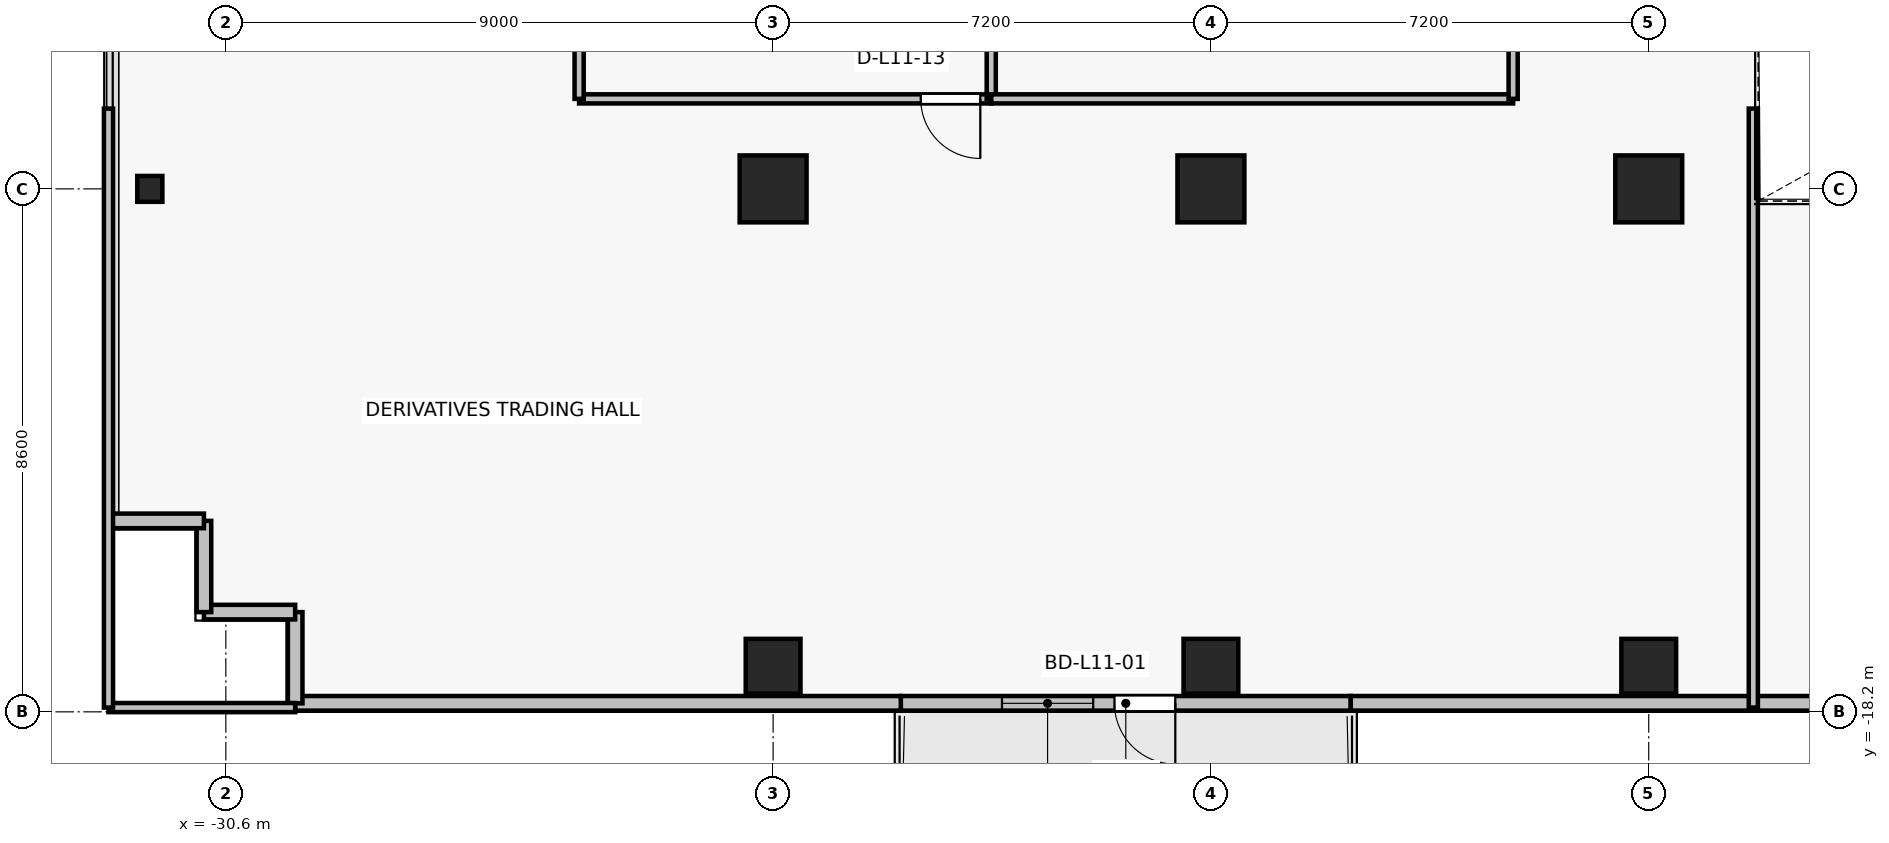
"""IFC4 building model, lengths in metres.
Left out: names, types, materials, properties, quantities, classifications, styles, units other than length and angle.
Written with IfcOpenShell. Run it as: python <this file> out.ifc"""

import sys

from ifc_helpers import new_model, si_unit, direction, frame, frame_2d, origin, origin_2d, place, context, subcontext, project, spatial, rectangle, i_section, extrude, source, transform, mapped, element, fill, save


model = new_model("IFC4")
c1 = context("Model", 3, precision=1e-05, world=origin(), true_north=direction((0.0, 1.0)))
c2 = subcontext(c1, "Body", "Model", "MODEL_VIEW")
j1 = project(units=[si_unit("LENGTHUNIT", "METRE"), si_unit("PLANEANGLEUNIT", "RADIAN")], contexts=[c1])
p1 = place(None, origin())
s1 = spatial("IfcSite", under=j1, at=p1, CompositionType="ELEMENT")
p2 = place(p1, origin())
s2 = spatial("IfcBuilding", under=s1, at=p2, CompositionType="ELEMENT")
p3 = place(p2, frame((0.0, 0.0, 43.9)))
s3 = spatial("IfcBuildingStorey", under=s2, at=p3, CompositionType="ELEMENT", Elevation=43.9)
for number, where, z_axis, x_axis in (
    (1, (-14.4, -9.6, 0.0), (0.0, 0.0, 1.0), (1.0, 0.0, 0.0)),
    (2, (-7.2, -9.6, 0.0), (0.0, 0.0, 1.0), (1.0, 0.0, 0.0)),
    (3, (-21.6, -9.6, 0.0), (0.0, 0.0, 1.0), (1.0, 0.0, 0.0)),
):
    element("IfcColumn", number, at=place(p3, frame(where, z_axis=z_axis, x_axis=x_axis)), inside=s3, PredefinedType="COLUMN", context=c2, shape_type="SweptSolid", body=[
        extrude(rectangle(XDim=1.1, YDim=1.1, at=origin_2d()), origin(), (0.0, 0.0, 1.0), 3.3),
    ])
for number, where, z_axis, x_axis in (
    (4, (-14.4, -17.45, 0.0), (0.0, 0.0, 1.0), (1.0, 0.0, 0.0)),
    (5, (-7.2, -17.45, 0.0), (0.0, 0.0, 1.0), (1.0, 0.0, 0.0)),
    (6, (-21.6, -17.45, 0.0), (0.0, 0.0, 1.0), (1.0, 0.0, 0.0)),
):
    element("IfcColumn", number, at=place(p3, frame(where, z_axis=z_axis, x_axis=x_axis)), inside=s3, PredefinedType="COLUMN", context=c2, shape_type="SweptSolid", body=[
        extrude(rectangle(XDim=0.9, YDim=0.9, at=origin_2d()), origin(), (0.0, 0.0, 1.0), 3.3),
    ])
p4 = place(p3, frame((-31.85, -9.6, 0.0), z_axis=(0.0, 0.0, 1.0), x_axis=(1.0, 0.0, 0.0)))
e7 = element("IfcColumn", 7, at=p4, inside=s3, PredefinedType="COLUMN", context=c2, shape_type="SweptSolid", body=[
    extrude(i_section(OverallWidth=0.412, OverallDepth=0.425, WebThickness=0.026, FlangeThickness=0.039, FilletRadius=0.015, at=origin_2d()), origin(), (0.0, 0.0, 1.0), 3.3),
])
p5 = place(p3, frame((-12.1, -18.06, 0.0), z_axis=(0.0, 0.0, 1.0), x_axis=(-1.0, 0.0, 0.0)))
e8 = element("IfcWall", 8, at=p5, inside=s3, PredefinedType="SOLIDWALL", context=c2, shape_type="SweptSolid", body=[
    extrude(rectangle(XDim=7.4, YDim=0.24, at=frame_2d((3.7, 0.0))), origin(), (0.0, 0.0, 1.0), 2.665),
])
p6 = place(p5, frame((2.886, 0.0, 0.0)))
e9 = element("IfcOpeningElement", 9, at=p6, cuts=e8, PredefinedType="OPENING", context=c2, shape_type="SweptSolid", body=[
    extrude(rectangle(XDim=1.0, YDim=2.2, at=frame_2d((0.5, 1.1))), frame((0.0, 0.13, 0.0), z_axis=(0.0, -1.0, 0.0), x_axis=(1.0, 0.0, 0.0)), (0.0, 0.0, 1.0), 0.26),
])
p7 = place(p5, frame((4.236, 0.0, 0.85)))
e10 = element("IfcOpeningElement", 10, at=p7, cuts=e8, PredefinedType="OPENING", context=c2, shape_type="SweptSolid", body=[
    extrude(rectangle(XDim=1.5, YDim=1.6, at=frame_2d((0.75, 0.8))), frame((0.0, 0.13, 0.0), z_axis=(0.0, -1.0, 0.0), x_axis=(1.0, 0.0, 0.0)), (0.0, 0.0, 1.0), 0.26),
])
p8 = place(p3, frame((-12.1, -18.06, 0.0), z_axis=(0.0, 0.0, 1.0), x_axis=(1.0, 0.0, 0.0)))
e11 = element("IfcWall", 11, at=p8, inside=s3, PredefinedType="SOLIDWALL", context=c2, shape_type="SweptSolid", body=[
    extrude(rectangle(XDim=8.76, YDim=0.24, at=frame_2d((4.38, 0.0))), origin(), (0.0, 0.0, 1.0), 3.075),
])
p9 = place(p3, frame((-29.46, -18.06, 0.0), z_axis=(0.0, 0.0, 1.0), x_axis=(1.0, 0.0, 0.0)))
e12 = element("IfcWall", 12, at=p9, inside=s3, PredefinedType="SOLIDWALL", context=c2, shape_type="SweptSolid", body=[
    extrude(rectangle(XDim=9.96, YDim=0.24, at=frame_2d((4.98, 0.0))), origin(), (0.0, 0.0, 1.0), 2.665),
])
for number, where, z_axis, x_axis in (
    (13, (-29.46, -16.56, 0.0), (0.0, 0.0, 1.0), (0.0, -1.0, 0.0)),
    (14, (-30.96, -16.56, 0.0), (0.0, 0.0, 1.0), (1.0, 0.0, 0.0)),
    (15, (-30.96, -15.06, 0.0), (0.0, 0.0, 1.0), (0.0, -1.0, 0.0)),
    (16, (-32.46, -15.06, 0.0), (0.0, 0.0, 1.0), (1.0, 0.0, 0.0)),
):
    element("IfcWall", number, at=place(p3, frame(where, z_axis=z_axis, x_axis=x_axis)), inside=s3, PredefinedType="SOLIDWALL", context=c2, shape_type="SweptSolid", body=[
        extrude(rectangle(XDim=1.5, YDim=0.24, at=frame_2d((0.75, 0.0))), origin(), (0.0, 0.0, 1.0), 3.075),
    ])
p10 = place(p3, frame((-18.012, -8.12, 0.0), z_axis=(0.0, 0.0, 1.0), x_axis=(-1.0, 0.0, 0.0)))
e17 = element("IfcWall", 17, at=p10, inside=s3, PredefinedType="PARTITIONING", context=c2, shape_type="SweptSolid", body=[
    extrude(rectangle(XDim=6.778, YDim=0.15, at=frame_2d((3.389, 0.0))), origin(), (0.0, 0.0, 1.0), 2.465),
])
p11 = place(p10, frame((0.18, 0.0, 0.0)))
e18 = element("IfcOpeningElement", 18, at=p11, cuts=e17, PredefinedType="OPENING", context=c2, shape_type="SweptSolid", body=[
    extrude(rectangle(XDim=0.98, YDim=2.15, at=frame_2d((0.49, 1.075))), frame((0.0, 0.085, 0.0), z_axis=(0.0, -1.0, 0.0), x_axis=(1.0, 0.0, 0.0)), (0.0, 0.0, 1.0), 0.17),
])
for number, where, z_axis, x_axis in (
    (19, (-24.79, -8.12, 0.0), (0.0, 0.0, 1.0), (0.0, 1.0, 0.0)),
    (20, (-18.012, -3.83, 0.0), (0.0, 0.0, 1.0), (0.0, -1.0, 0.0)),
):
    element("IfcWall", number, at=place(p3, frame(where, z_axis=z_axis, x_axis=x_axis)), inside=s3, PredefinedType="PARTITIONING", context=c2, shape_type="SweptSolid", body=[
        extrude(rectangle(XDim=4.29, YDim=0.15, at=frame_2d((2.145, 0.0))), origin(), (0.0, 0.0, 1.0), 2.565),
    ])
p12 = place(p3, frame((-9.43, -8.12, 0.0), z_axis=(0.0, 0.0, 1.0), x_axis=(-1.0, 0.0, 0.0)))
e21 = element("IfcWall", 21, at=p12, inside=s3, PredefinedType="PARTITIONING", context=c2, shape_type="SweptSolid", body=[
    extrude(rectangle(XDim=8.583, YDim=0.15, at=frame_2d((4.291, 0.0))), origin(), (0.0, 0.0, 1.0), 2.465),
])
p13 = place(p3, frame((-9.43, -3.83, 0.0), z_axis=(0.0, 0.0, 1.0), x_axis=(0.0, -1.0, 0.0)))
e22 = element("IfcWall", 22, at=p13, inside=s3, PredefinedType="PARTITIONING", context=c2, shape_type="SweptSolid", body=[
    extrude(rectangle(XDim=4.29, YDim=0.15, at=frame_2d((2.145, 0.0))), origin(), (0.0, 0.0, 1.0), 2.565),
])
p14 = place(p3, frame((-29.46, -18.13, 0.0), z_axis=(0.0, 0.0, 1.0), x_axis=(-1.0, 0.0, 0.0)))
e23 = element("IfcWall", 23, at=p14, inside=s3, PredefinedType="PARTITIONING", context=c2, shape_type="SweptSolid", body=[
    extrude(rectangle(XDim=3.07, YDim=0.15, at=frame_2d((1.535, 0.0))), origin(), (0.0, 0.0, 1.0), 2.665),
])
p15 = place(p3, frame((-32.53, -18.13, 0.0), z_axis=(0.0, 0.0, 1.0), x_axis=(0.0, 1.0, 0.0)))
e24 = element("IfcWall", 24, at=p15, inside=s3, PredefinedType="PARTITIONING", context=c2, shape_type="SweptSolid", body=[
    extrude(rectangle(XDim=9.85, YDim=0.15, at=frame_2d((4.925, 0.0))), origin(), (0.0, 0.0, 1.0), 2.665),
])
p16 = place(p3, frame((-5.48, -8.28, 0.0), z_axis=(0.0, 0.0, 1.0), x_axis=(0.0, -1.0, 0.0)))
e25 = element("IfcWall", 25, at=p16, inside=s3, PredefinedType="PARTITIONING", context=c2, shape_type="SweptSolid", body=[
    extrude(rectangle(XDim=9.85, YDim=0.15, at=frame_2d((4.925, 0.0))), origin(), (0.0, 0.0, 1.0), 2.465),
])
m1 = source(origin(), c2, "Body", "SweptSolid", [
    extrude(rectangle(XDim=1.0, YDim=2.2, at=frame_2d((0.5, 1.1))), frame((0.0, 0.025, 0.0), z_axis=(0.0, -1.0, 0.0), x_axis=(1.0, 0.0, 0.0)), (0.0, 0.0, 1.0), 0.05),
])
p17 = place(p6, origin())
e26 = element("IfcDoor", 26, at=p17, inside=s3, OperationType="SINGLE_SWING_LEFT", PredefinedType="DOOR", context=c2, shape_type="MappedRepresentation", body=[
    mapped(m1, transform((0.0, 0.0, 0.0), x_axis=(1.0, 0.0, 0.0), y_axis=(0.0, 1.0, 0.0), z_axis=(0.0, 0.0, 1.0), scale=1.0)),
])
fill(e9, e26)
m2 = source(origin(), c2, "Body", "SweptSolid", [
    extrude(rectangle(XDim=1.5, YDim=1.6, at=frame_2d((0.75, 0.8))), frame((0.0, 0.03, 0.0), z_axis=(0.0, -1.0, 0.0), x_axis=(1.0, 0.0, 0.0)), (0.0, 0.0, 1.0), 0.06),
])
p18 = place(p7, origin())
e27 = element("IfcWindow", 27, at=p18, inside=s3, PartitioningType="SINGLE_PANEL", PredefinedType="WINDOW", context=c2, shape_type="MappedRepresentation", body=[
    mapped(m2, transform((0.0, 0.0, 0.0), x_axis=(1.0, 0.0, 0.0), y_axis=(0.0, 1.0, 0.0), z_axis=(0.0, 0.0, 1.0), scale=1.0)),
])
fill(e10, e27)
m3 = source(origin(), c2, "Body", "SweptSolid", [
    extrude(rectangle(XDim=0.98, YDim=2.15, at=frame_2d((0.49, 1.075))), frame((0.0, 0.025, 0.0), z_axis=(0.0, -1.0, 0.0), x_axis=(1.0, 0.0, 0.0)), (0.0, 0.0, 1.0), 0.05),
])
p19 = place(p11, origin())
e28 = element("IfcDoor", 28, at=p19, inside=s3, OperationType="SINGLE_SWING_LEFT", PredefinedType="DOOR", context=c2, shape_type="MappedRepresentation", body=[
    mapped(m3, transform((0.0, 0.0, 0.0), x_axis=(1.0, 0.0, 0.0), y_axis=(0.0, 1.0, 0.0), z_axis=(0.0, 0.0, 1.0), scale=1.0)),
])
fill(e18, e28)
save(model, sys.argv[1])
